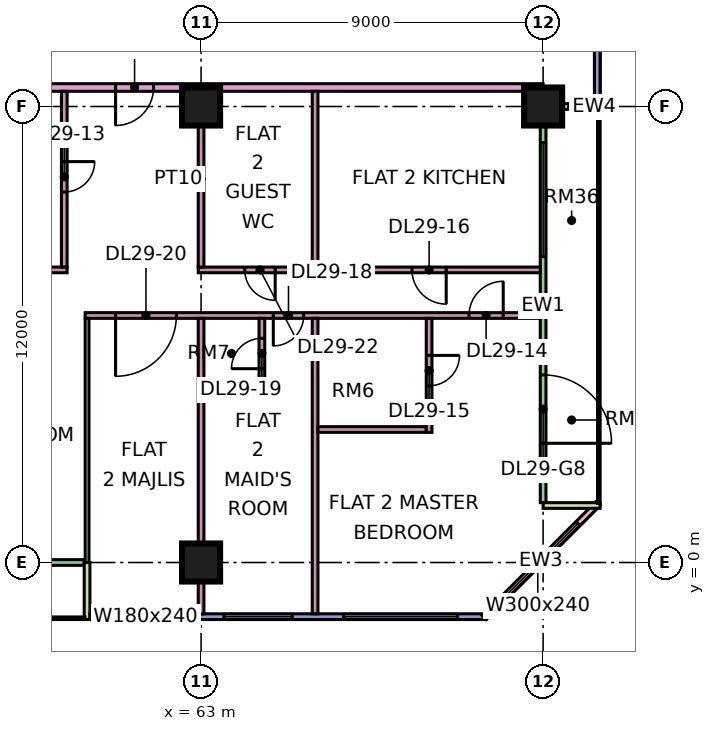
"""IFC4 building model, lengths in metres.
Left out: names, types, materials, properties, quantities, classifications, styles, units other than length and angle.
Written with IfcOpenShell. Run it as: python <this file> out.ifc"""

import sys

from ifc_helpers import new_model, si_unit, direction, frame, frame_2d, origin, origin_2d, place, context, subcontext, project, spatial, rectangle, extrude, element, fill, save


model = new_model("IFC4")
c1 = context("Model", 3, precision=1e-05, world=origin(), true_north=direction((0.0, 1.0)))
c2 = subcontext(c1, "Body", "Model", "MODEL_VIEW")
j1 = project(units=[si_unit("LENGTHUNIT", "METRE"), si_unit("PLANEANGLEUNIT", "RADIAN")], contexts=[c1])
p1 = place(None, origin())
s1 = spatial("IfcSite", under=j1, at=p1, CompositionType="ELEMENT")
p2 = place(p1, origin())
s2 = spatial("IfcBuilding", under=s1, at=p2, CompositionType="ELEMENT")
p3 = place(p2, frame((0.0, 0.0, 125.65)))
s3 = spatial("IfcBuildingStorey", under=s2, at=p3, CompositionType="ELEMENT", Elevation=125.65)
for number, where, z_axis, x_axis in (
    (1, (63.0, 0.0, 0.0), (0.0, 0.0, 1.0), (1.0, 0.0, 0.0)),
    (2, (63.0, 12.0, 0.0), (0.0, 0.0, 1.0), (1.0, 0.0, 0.0)),
    (3, (72.0, 12.0, 0.0), (0.0, 0.0, 1.0), (1.0, 0.0, 0.0)),
):
    element("IfcColumn", number, at=place(p3, frame(where, z_axis=z_axis, x_axis=x_axis)), inside=s3, PredefinedType="COLUMN", context=c2, shape_type="SweptSolid", body=[
        extrude(rectangle(XDim=1.0, YDim=1.0, at=origin_2d()), origin(), (0.0, 0.0, 1.0), 3.75),
    ])
p4 = place(p3, frame((48.075, 0.0, 0.0), z_axis=(0.0, 0.0, 1.0), x_axis=(1.0, 0.0, 0.0)))
e4 = element("IfcWall", 4, at=p4, inside=s3, PredefinedType="SOLIDWALL", context=c2, shape_type="SweptSolid", body=[
    extrude(rectangle(XDim=11.85, YDim=0.15, at=frame_2d((5.925, 0.0))), origin(), (0.0, 0.0, 1.0), 3.35),
])
p5 = place(p4, frame((0.562, 0.0, 0.45)))
e5 = element("IfcOpeningElement", 5, at=p5, cuts=e4, PredefinedType="OPENING", context=c2, shape_type="SweptSolid", body=[
    extrude(rectangle(XDim=1.8, YDim=2.4, at=frame_2d((0.9, 1.2))), frame((0.0, 0.085, 0.0), z_axis=(0.0, -1.0, 0.0), x_axis=(1.0, 0.0, 0.0)), (0.0, 0.0, 1.0), 0.17),
])
p6 = place(p4, frame((3.525, 0.0, 0.0)))
e6 = element("IfcOpeningElement", 6, at=p6, cuts=e4, PredefinedType="OPENING", context=c2, shape_type="SweptSolid", body=[
    extrude(rectangle(XDim=1.2, YDim=2.4, at=frame_2d((0.6, 1.2))), frame((0.0, 0.085, 0.0), z_axis=(0.0, -1.0, 0.0), x_axis=(1.0, 0.0, 0.0)), (0.0, 0.0, 1.0), 0.17),
])
p7 = place(p4, frame((7.688, 0.0, 0.45)))
e7 = element("IfcOpeningElement", 7, at=p7, cuts=e4, PredefinedType="OPENING", context=c2, shape_type="SweptSolid", body=[
    extrude(rectangle(XDim=3.0, YDim=2.4, at=frame_2d((1.5, 1.2))), frame((0.0, 0.085, 0.0), z_axis=(0.0, -1.0, 0.0), x_axis=(1.0, 0.0, 0.0)), (0.0, 0.0, 1.0), 0.17),
])
p8 = place(p3, frame((60.0, -1.5, 0.0), z_axis=(0.0, 0.0, 1.0), x_axis=(0.0, 1.0, 0.0)))
e8 = element("IfcWall", 8, at=p8, inside=s3, PredefinedType="SOLIDWALL", context=c2, shape_type="SweptSolid", body=[
    extrude(rectangle(XDim=1.5, YDim=0.15, at=frame_2d((0.75, 0.0))), origin(), (0.0, 0.0, 1.0), 3.35),
])
p9 = place(p3, frame((60.075, -1.425, 0.0), z_axis=(0.0, 0.0, 1.0), x_axis=(1.0, 0.0, 0.0)))
e9 = element("IfcWall", 9, at=p9, inside=s3, PredefinedType="SOLIDWALL", context=c2, shape_type="SweptSolid", body=[
    extrude(rectangle(XDim=10.425, YDim=0.15, at=frame_2d((5.212, 0.0))), origin(), (0.0, 0.0, 1.0), 3.35),
])
p10 = place(p9, frame((0.562, 0.0, 0.45)))
e10 = element("IfcOpeningElement", 10, at=p10, cuts=e9, PredefinedType="OPENING", context=c2, shape_type="SweptSolid", body=[
    extrude(rectangle(XDim=1.8, YDim=2.4, at=frame_2d((0.9, 1.2))), frame((0.0, 0.085, 0.0), z_axis=(0.0, -1.0, 0.0), x_axis=(1.0, 0.0, 0.0)), (0.0, 0.0, 1.0), 0.17),
])
p11 = place(p9, frame((3.525, 0.0, 0.45)))
e11 = element("IfcOpeningElement", 11, at=p11, cuts=e9, PredefinedType="OPENING", context=c2, shape_type="SweptSolid", body=[
    extrude(rectangle(XDim=1.8, YDim=2.4, at=frame_2d((0.9, 1.2))), frame((0.0, 0.085, 0.0), z_axis=(0.0, -1.0, 0.0), x_axis=(1.0, 0.0, 0.0)), (0.0, 0.0, 1.0), 0.17),
])
p12 = place(p9, frame((6.675, 0.0, 0.45)))
e12 = element("IfcOpeningElement", 12, at=p12, cuts=e9, PredefinedType="OPENING", context=c2, shape_type="SweptSolid", body=[
    extrude(rectangle(XDim=3.0, YDim=2.4, at=frame_2d((1.5, 1.2))), frame((0.0, 0.085, 0.0), z_axis=(0.0, -1.0, 0.0), x_axis=(1.0, 0.0, 0.0)), (0.0, 0.0, 1.0), 0.17),
])
p13 = place(p3, frame((70.447, -1.447, 0.0), z_axis=(0.0, 0.0, 1.0), x_axis=(0.707106781187, 0.707106781187, 0.0)))
e13 = element("IfcWall", 13, at=p13, inside=s3, PredefinedType="SOLIDWALL", context=c2, shape_type="SweptSolid", body=[
    extrude(rectangle(XDim=4.243, YDim=0.15, at=frame_2d((2.121, 0.0))), origin(), (0.0, 0.0, 1.0), 3.35),
])
p14 = place(p13, frame((0.498, 0.0, 0.45)))
e14 = element("IfcOpeningElement", 14, at=p14, cuts=e13, PredefinedType="OPENING", context=c2, shape_type="SweptSolid", body=[
    extrude(rectangle(XDim=3.0, YDim=2.4, at=frame_2d((1.5, 1.2))), frame((0.0, 0.085, 0.0), z_axis=(0.0, -1.0, 0.0), x_axis=(1.0, 0.0, 0.0)), (0.0, 0.0, 1.0), 0.17),
])
p15 = place(p3, frame((72.0, 1.575, 0.0), z_axis=(0.0, 0.0, 1.0), x_axis=(0.0, 1.0, 0.0)))
e15 = element("IfcWall", 15, at=p15, inside=s3, PredefinedType="SOLIDWALL", context=c2, shape_type="SweptSolid", body=[
    extrude(rectangle(XDim=10.35, YDim=0.15, at=frame_2d((5.175, 0.0))), origin(), (0.0, 0.0, 1.0), 3.35),
])
p16 = place(p15, frame((1.562, 0.0, 0.0)))
e16 = element("IfcOpeningElement", 16, at=p16, cuts=e15, PredefinedType="OPENING", context=c2, shape_type="SweptSolid", body=[
    extrude(rectangle(XDim=1.8, YDim=2.4, at=frame_2d((0.9, 1.2))), frame((0.0, 0.085, 0.0), z_axis=(0.0, -1.0, 0.0), x_axis=(1.0, 0.0, 0.0)), (0.0, 0.0, 1.0), 0.17),
])
p17 = place(p15, frame((6.475, 0.0, 0.45)))
e17 = element("IfcOpeningElement", 17, at=p17, cuts=e15, PredefinedType="OPENING", context=c2, shape_type="SweptSolid", body=[
    extrude(rectangle(XDim=3.0, YDim=2.4, at=frame_2d((1.5, 1.2))), frame((0.0, 0.085, 0.0), z_axis=(0.0, -1.0, 0.0), x_axis=(1.0, 0.0, 0.0)), (0.0, 0.0, 1.0), 0.17),
])
for number, where, z_axis, x_axis in (
    (18, (73.5, 1.5, 0.0), (0.0, 0.0, 1.0), (-1.0, 0.0, 0.0)),
    (19, (73.5, 12.0, 0.0), (0.0, 0.0, 1.0), (-1.0, 0.0, 0.0)),
):
    element("IfcWall", number, at=place(p3, frame(where, z_axis=z_axis, x_axis=x_axis)), inside=s3, PredefinedType="SOLIDWALL", context=c2, shape_type="SweptSolid", body=[
        extrude(rectangle(XDim=1.5, YDim=0.15, at=frame_2d((0.75, 0.0))), origin(), (0.0, 0.0, 1.0), 3.35),
    ])
p18 = place(p3, frame((73.425, 12.075, 0.0), z_axis=(0.0, 0.0, 1.0), x_axis=(0.0, 1.0, 0.0)))
e20 = element("IfcWall", 20, at=p18, inside=s3, PredefinedType="SOLIDWALL", context=c2, shape_type="SweptSolid", body=[
    extrude(rectangle(XDim=10.425, YDim=0.15, at=frame_2d((5.212, 0.0))), origin(), (0.0, 0.0, 1.0), 3.35),
])
p19 = place(p18, frame((4.575, 0.0, 0.45)))
e21 = element("IfcOpeningElement", 21, at=p19, cuts=e20, PredefinedType="OPENING", context=c2, shape_type="SweptSolid", body=[
    extrude(rectangle(XDim=4.8, YDim=2.4, at=frame_2d((2.4, 1.2))), frame((0.0, 0.085, 0.0), z_axis=(0.0, -1.0, 0.0), x_axis=(1.0, 0.0, 0.0)), (0.0, 0.0, 1.0), 0.17),
])
p20 = place(p3, frame((40.65, 12.5, 0.0), z_axis=(0.0, 0.0, 1.0), x_axis=(1.0, 0.0, 0.0)))
e22 = element("IfcWall", 22, at=p20, inside=s3, PredefinedType="PARTITIONING", context=c2, shape_type="SweptSolid", body=[
    extrude(rectangle(XDim=31.35, YDim=0.2, at=frame_2d((15.675, 0.0))), origin(), (0.0, 0.0, 1.0), 3.35),
])
p21 = place(p20, frame((20.1, 0.0, 0.0)))
e23 = element("IfcOpeningElement", 23, at=p21, cuts=e22, PredefinedType="OPENING", context=c2, shape_type="SweptSolid", body=[
    extrude(rectangle(XDim=1.0, YDim=2.1, at=frame_2d((0.5, 1.05))), frame((0.0, 0.11, 0.0), z_axis=(0.0, -1.0, 0.0), x_axis=(1.0, 0.0, 0.0)), (0.0, 0.0, 1.0), 0.22),
])
p22 = place(p20, frame((1.05, 0.0, 0.0)))
e24 = element("IfcOpeningElement", 24, at=p22, cuts=e22, PredefinedType="OPENING", context=c2, shape_type="SweptSolid", body=[
    extrude(rectangle(XDim=1.0, YDim=2.1, at=frame_2d((0.5, 1.05))), frame((0.0, 0.11, 0.0), z_axis=(0.0, -1.0, 0.0), x_axis=(1.0, 0.0, 0.0)), (0.0, 0.0, 1.0), 0.22),
])
p23 = place(p3, frame((54.1, 7.7, 0.0), z_axis=(0.0, 0.0, 1.0), x_axis=(1.0, 0.0, 0.0)))
e25 = element("IfcWall", 25, at=p23, inside=s3, PredefinedType="PARTITIONING", context=c2, shape_type="SweptSolid", body=[
    extrude(rectangle(XDim=5.375, YDim=0.15, at=frame_2d((2.688, 0.0))), origin(), (0.0, 0.0, 1.0), 3.35),
])
p24 = place(p23, frame((1.1, 0.0, 0.0)))
e26 = element("IfcOpeningElement", 26, at=p24, cuts=e25, PredefinedType="OPENING", context=c2, shape_type="SweptSolid", body=[
    extrude(rectangle(XDim=0.9, YDim=2.1, at=frame_2d((0.45, 1.05))), frame((0.0, 0.085, 0.0), z_axis=(0.0, -1.0, 0.0), x_axis=(1.0, 0.0, 0.0)), (0.0, 0.0, 1.0), 0.17),
])
p25 = place(p3, frame((59.4, 7.775, 0.0), z_axis=(0.0, 0.0, 1.0), x_axis=(0.0, 1.0, 0.0)))
e27 = element("IfcWall", 27, at=p25, inside=s3, PredefinedType="PARTITIONING", context=c2, shape_type="SweptSolid", body=[
    extrude(rectangle(XDim=4.625, YDim=0.15, at=frame_2d((2.312, 0.0))), origin(), (0.0, 0.0, 1.0), 3.35),
])
p26 = place(p25, frame((1.975, 0.0, 0.0)))
e28 = element("IfcOpeningElement", 28, at=p26, cuts=e27, PredefinedType="OPENING", context=c2, shape_type="SweptSolid", body=[
    extrude(rectangle(XDim=0.8, YDim=2.1, at=frame_2d((0.4, 1.05))), frame((0.0, 0.085, 0.0), z_axis=(0.0, -1.0, 0.0), x_axis=(1.0, 0.0, 0.0)), (0.0, 0.0, 1.0), 0.17),
])
p27 = place(p3, frame((59.95, 6.5, 0.0), z_axis=(0.0, 0.0, 1.0), x_axis=(1.0, 0.0, 0.0)))
e29 = element("IfcWall", 29, at=p27, inside=s3, PredefinedType="PARTITIONING", context=c2, shape_type="SweptSolid", body=[
    extrude(rectangle(XDim=11.976, YDim=0.15, at=frame_2d((5.988, 0.0))), origin(), (0.0, 0.0, 1.0), 3.35),
])
p28 = place(p27, frame((10.1, 0.0, 0.0)))
e30 = element("IfcOpeningElement", 30, at=p28, cuts=e29, PredefinedType="OPENING", context=c2, shape_type="SweptSolid", body=[
    extrude(rectangle(XDim=0.9, YDim=2.1, at=frame_2d((0.45, 1.05))), frame((0.0, 0.085, 0.0), z_axis=(0.0, -1.0, 0.0), x_axis=(1.0, 0.0, 0.0)), (0.0, 0.0, 1.0), 0.17),
])
p29 = place(p27, frame((4.95, 0.0, 0.0)))
e31 = element("IfcOpeningElement", 31, at=p29, cuts=e29, PredefinedType="OPENING", context=c2, shape_type="SweptSolid", body=[
    extrude(rectangle(XDim=0.8, YDim=2.1, at=frame_2d((0.4, 1.05))), frame((0.0, 0.085, 0.0), z_axis=(0.0, -1.0, 0.0), x_axis=(1.0, 0.0, 0.0)), (0.0, 0.0, 1.0), 0.17),
])
p30 = place(p27, frame((0.8, 0.0, 0.0)))
e32 = element("IfcOpeningElement", 32, at=p30, cuts=e29, PredefinedType="OPENING", context=c2, shape_type="SweptSolid", body=[
    extrude(rectangle(XDim=1.6, YDim=2.1, at=frame_2d((0.8, 1.05))), frame((0.0, 0.085, 0.0), z_axis=(0.0, -1.0, 0.0), x_axis=(1.0, 0.0, 0.0)), (0.0, 0.0, 1.0), 0.17),
])
p31 = place(p3, frame((60.0, 0.0, 0.0), z_axis=(0.0, 0.0, 1.0), x_axis=(0.0, 1.0, 0.0)))
e33 = element("IfcWall", 33, at=p31, inside=s3, PredefinedType="PARTITIONING", context=c2, shape_type="SweptSolid", body=[
    extrude(rectangle(XDim=6.425, YDim=0.1, at=frame_2d((3.212, 0.0))), origin(), (0.0, 0.0, 1.0), 3.35),
])
p32 = place(p3, frame((62.925, 7.7, 0.0), z_axis=(0.0, 0.0, 1.0), x_axis=(1.0, 0.0, 0.0)))
e34 = element("IfcWall", 34, at=p32, inside=s3, PredefinedType="PARTITIONING", context=c2, shape_type="SweptSolid", body=[
    extrude(rectangle(XDim=9.001, YDim=0.15, at=frame_2d((4.5, 0.0))), origin(), (0.0, 0.0, 1.0), 3.35),
])
p33 = place(p32, frame((5.625, 0.0, 0.0)))
e35 = element("IfcOpeningElement", 35, at=p33, cuts=e34, PredefinedType="OPENING", context=c2, shape_type="SweptSolid", body=[
    extrude(rectangle(XDim=0.9, YDim=2.1, at=frame_2d((0.45, 1.05))), frame((0.0, 0.085, 0.0), z_axis=(0.0, -1.0, 0.0), x_axis=(1.0, 0.0, 0.0)), (0.0, 0.0, 1.0), 0.17),
])
p34 = place(p32, frame((1.225, 0.0, 0.0)))
e36 = element("IfcOpeningElement", 36, at=p34, cuts=e34, PredefinedType="OPENING", context=c2, shape_type="SweptSolid", body=[
    extrude(rectangle(XDim=0.8, YDim=2.1, at=frame_2d((0.4, 1.05))), frame((0.0, 0.085, 0.0), z_axis=(0.0, -1.0, 0.0), x_axis=(1.0, 0.0, 0.0)), (0.0, 0.0, 1.0), 0.17),
])
p35 = place(p3, frame((63.0, -1.351, 0.0), z_axis=(0.0, 0.0, 1.0), x_axis=(0.0, 1.0, 0.0)))
e37 = element("IfcWall", 37, at=p35, inside=s3, PredefinedType="PARTITIONING", context=c2, shape_type="SweptSolid", body=[
    extrude(rectangle(XDim=7.776, YDim=0.15, at=frame_2d((3.888, 0.0))), origin(), (0.0, 0.0, 1.0), 3.35),
])
p36 = place(p3, frame((63.0, 7.775, 0.0), z_axis=(0.0, 0.0, 1.0), x_axis=(0.0, 1.0, 0.0)))
e38 = element("IfcWall", 38, at=p36, inside=s3, PredefinedType="PARTITIONING", context=c2, shape_type="SweptSolid", body=[
    extrude(rectangle(XDim=4.625, YDim=0.15, at=frame_2d((2.312, 0.0))), origin(), (0.0, 0.0, 1.0), 3.35),
])
p37 = place(p3, frame((63.075, 4.5, 0.0), z_axis=(0.0, 0.0, 1.0), x_axis=(1.0, 0.0, 0.0)))
e39 = element("IfcWall", 39, at=p37, inside=s3, PredefinedType="PARTITIONING", context=c2, shape_type="SweptSolid", body=[
    extrude(rectangle(XDim=1.45, YDim=0.15, at=frame_2d((0.725, 0.0))), origin(), (0.0, 0.0, 1.0), 3.35),
])
p38 = place(p3, frame((64.6, 4.425, 0.0), z_axis=(0.0, 0.0, 1.0), x_axis=(0.0, 1.0, 0.0)))
e40 = element("IfcWall", 40, at=p38, inside=s3, PredefinedType="PARTITIONING", context=c2, shape_type="SweptSolid", body=[
    extrude(rectangle(XDim=2.0, YDim=0.15, at=frame_2d((1.0, 0.0))), origin(), (0.0, 0.0, 1.0), 3.35),
])
p39 = place(p38, frame((0.675, 0.0, 0.0)))
e41 = element("IfcOpeningElement", 41, at=p39, cuts=e40, PredefinedType="OPENING", context=c2, shape_type="SweptSolid", body=[
    extrude(rectangle(XDim=0.8, YDim=2.1, at=frame_2d((0.4, 1.05))), frame((0.0, 0.085, 0.0), z_axis=(0.0, -1.0, 0.0), x_axis=(1.0, 0.0, 0.0)), (0.0, 0.0, 1.0), 0.17),
])
p40 = place(p3, frame((66.0, -1.351, 0.0), z_axis=(0.0, 0.0, 1.0), x_axis=(0.0, 1.0, 0.0)))
e42 = element("IfcWall", 42, at=p40, inside=s3, PredefinedType="PARTITIONING", context=c2, shape_type="SweptSolid", body=[
    extrude(rectangle(XDim=7.776, YDim=0.15, at=frame_2d((3.888, 0.0))), origin(), (0.0, 0.0, 1.0), 3.35),
])
p41 = place(p3, frame((66.0, 7.775, 0.0), z_axis=(0.0, 0.0, 1.0), x_axis=(0.0, 1.0, 0.0)))
e43 = element("IfcWall", 43, at=p41, inside=s3, PredefinedType="PARTITIONING", context=c2, shape_type="SweptSolid", body=[
    extrude(rectangle(XDim=4.625, YDim=0.15, at=frame_2d((2.312, 0.0))), origin(), (0.0, 0.0, 1.0), 3.35),
])
p42 = place(p3, frame((66.075, 3.5, 0.0), z_axis=(0.0, 0.0, 1.0), x_axis=(1.0, 0.0, 0.0)))
e44 = element("IfcWall", 44, at=p42, inside=s3, PredefinedType="PARTITIONING", context=c2, shape_type="SweptSolid", body=[
    extrude(rectangle(XDim=2.85, YDim=0.15, at=frame_2d((1.425, 0.0))), origin(), (0.0, 0.0, 1.0), 3.35),
])
p43 = place(p3, frame((69.0, 3.425, 0.0), z_axis=(0.0, 0.0, 1.0), x_axis=(0.0, 1.0, 0.0)))
e45 = element("IfcWall", 45, at=p43, inside=s3, PredefinedType="PARTITIONING", context=c2, shape_type="SweptSolid", body=[
    extrude(rectangle(XDim=3.0, YDim=0.15, at=frame_2d((1.5, 0.0))), origin(), (0.0, 0.0, 1.0), 3.35),
])
p44 = place(p43, frame((1.225, 0.0, 0.0)))
e46 = element("IfcOpeningElement", 46, at=p44, cuts=e45, PredefinedType="OPENING", context=c2, shape_type="SweptSolid", body=[
    extrude(rectangle(XDim=0.8, YDim=2.1, at=frame_2d((0.4, 1.05))), frame((0.0, 0.085, 0.0), z_axis=(0.0, -1.0, 0.0), x_axis=(1.0, 0.0, 0.0)), (0.0, 0.0, 1.0), 0.17),
])
p45 = place(p10, origin())
e47 = element("IfcWindow", 47, at=p45, inside=s3, PartitioningType="SINGLE_PANEL", PredefinedType="WINDOW", context=c2, shape_type="SweptSolid", body=[
    extrude(rectangle(XDim=1.8, YDim=2.4, at=frame_2d((0.9, 1.2))), frame((0.0, 0.03, 0.0), z_axis=(0.0, -1.0, 0.0), x_axis=(1.0, 0.0, 0.0)), (0.0, 0.0, 1.0), 0.06),
])
fill(e10, e47)
p46 = place(p11, origin())
e48 = element("IfcWindow", 48, at=p46, inside=s3, PartitioningType="SINGLE_PANEL", PredefinedType="WINDOW", context=c2, shape_type="SweptSolid", body=[
    extrude(rectangle(XDim=1.8, YDim=2.4, at=frame_2d((0.9, 1.2))), frame((0.0, 0.03, 0.0), z_axis=(0.0, -1.0, 0.0), x_axis=(1.0, 0.0, 0.0)), (0.0, 0.0, 1.0), 0.06),
])
fill(e11, e48)
p47 = place(p12, origin())
e49 = element("IfcWindow", 49, at=p47, inside=s3, PartitioningType="SINGLE_PANEL", PredefinedType="WINDOW", context=c2, shape_type="SweptSolid", body=[
    extrude(rectangle(XDim=3.0, YDim=2.4, at=frame_2d((1.5, 1.2))), frame((0.0, 0.03, 0.0), z_axis=(0.0, -1.0, 0.0), x_axis=(1.0, 0.0, 0.0)), (0.0, 0.0, 1.0), 0.06),
])
fill(e12, e49)
p48 = place(p14, origin())
e50 = element("IfcWindow", 50, at=p48, inside=s3, PartitioningType="SINGLE_PANEL", PredefinedType="WINDOW", context=c2, shape_type="SweptSolid", body=[
    extrude(rectangle(XDim=3.0, YDim=2.4, at=frame_2d((1.5, 1.2))), frame((0.0, 0.03, 0.0), z_axis=(0.0, -1.0, 0.0), x_axis=(1.0, 0.0, 0.0)), (0.0, 0.0, 1.0), 0.06),
])
fill(e14, e50)
p49 = place(p16, frame((1.8, 0.0, 0.0), z_axis=(0.0, 0.0, 1.0), x_axis=(-1.0, 0.0, 0.0)))
e51 = element("IfcDoor", 51, at=p49, inside=s3, OperationType="DOUBLE_DOOR_SINGLE_SWING", PredefinedType="DOOR", context=c2, shape_type="SweptSolid", body=[
    extrude(rectangle(XDim=1.8, YDim=2.4, at=frame_2d((0.9, 1.2))), frame((0.0, 0.025, 0.0), z_axis=(0.0, -1.0, 0.0), x_axis=(1.0, 0.0, 0.0)), (0.0, 0.0, 1.0), 0.05),
])
fill(e16, e51)
p50 = place(p17, origin())
e52 = element("IfcWindow", 52, at=p50, inside=s3, PartitioningType="SINGLE_PANEL", PredefinedType="WINDOW", context=c2, shape_type="SweptSolid", body=[
    extrude(rectangle(XDim=3.0, YDim=2.4, at=frame_2d((1.5, 1.2))), frame((0.0, 0.03, 0.0), z_axis=(0.0, -1.0, 0.0), x_axis=(1.0, 0.0, 0.0)), (0.0, 0.0, 1.0), 0.06),
])
fill(e17, e52)
p51 = place(p26, origin())
e53 = element("IfcDoor", 53, at=p51, inside=s3, OperationType="SINGLE_SWING_RIGHT", PredefinedType="DOOR", context=c2, shape_type="SweptSolid", body=[
    extrude(rectangle(XDim=0.8, YDim=2.1, at=frame_2d((0.4, 1.05))), frame((0.0, 0.025, 0.0), z_axis=(0.0, -1.0, 0.0), x_axis=(1.0, 0.0, 0.0)), (0.0, 0.0, 1.0), 0.05),
])
fill(e28, e53)
p52 = place(p28, frame((0.9, 0.0, 0.0), z_axis=(0.0, 0.0, 1.0), x_axis=(-1.0, 0.0, 0.0)))
e54 = element("IfcDoor", 54, at=p52, inside=s3, OperationType="SINGLE_SWING_RIGHT", PredefinedType="DOOR", context=c2, shape_type="SweptSolid", body=[
    extrude(rectangle(XDim=0.9, YDim=2.1, at=frame_2d((0.45, 1.05))), frame((0.0, 0.025, 0.0), z_axis=(0.0, -1.0, 0.0), x_axis=(1.0, 0.0, 0.0)), (0.0, 0.0, 1.0), 0.05),
])
fill(e30, e54)
p53 = place(p44, origin())
e55 = element("IfcDoor", 55, at=p53, inside=s3, OperationType="SINGLE_SWING_RIGHT", PredefinedType="DOOR", context=c2, shape_type="SweptSolid", body=[
    extrude(rectangle(XDim=0.8, YDim=2.1, at=frame_2d((0.4, 1.05))), frame((0.0, 0.025, 0.0), z_axis=(0.0, -1.0, 0.0), x_axis=(1.0, 0.0, 0.0)), (0.0, 0.0, 1.0), 0.05),
])
fill(e46, e55)
p54 = place(p33, origin())
e56 = element("IfcDoor", 56, at=p54, inside=s3, OperationType="SINGLE_SWING_RIGHT", PredefinedType="DOOR", context=c2, shape_type="SweptSolid", body=[
    extrude(rectangle(XDim=0.9, YDim=2.1, at=frame_2d((0.45, 1.05))), frame((0.0, 0.025, 0.0), z_axis=(0.0, -1.0, 0.0), x_axis=(1.0, 0.0, 0.0)), (0.0, 0.0, 1.0), 0.05),
])
fill(e35, e56)
p55 = place(p21, frame((1.0, 0.0, 0.0), z_axis=(0.0, 0.0, 1.0), x_axis=(-1.0, 0.0, 0.0)))
e57 = element("IfcDoor", 57, at=p55, inside=s3, OperationType="SINGLE_SWING_LEFT", PredefinedType="DOOR", context=c2, shape_type="SweptSolid", body=[
    extrude(rectangle(XDim=1.0, YDim=2.1, at=frame_2d((0.5, 1.05))), frame((0.0, 0.025, 0.0), z_axis=(0.0, -1.0, 0.0), x_axis=(1.0, 0.0, 0.0)), (0.0, 0.0, 1.0), 0.05),
])
fill(e23, e57)
p56 = place(p29, frame((0.8, 0.0, 0.0), z_axis=(0.0, 0.0, 1.0), x_axis=(-1.0, 0.0, 0.0)))
e58 = element("IfcDoor", 58, at=p56, inside=s3, OperationType="SINGLE_SWING_LEFT", PredefinedType="DOOR", context=c2, shape_type="SweptSolid", body=[
    extrude(rectangle(XDim=0.8, YDim=2.1, at=frame_2d((0.4, 1.05))), frame((0.0, 0.025, 0.0), z_axis=(0.0, -1.0, 0.0), x_axis=(1.0, 0.0, 0.0)), (0.0, 0.0, 1.0), 0.05),
])
fill(e31, e58)
p57 = place(p39, origin())
e59 = element("IfcDoor", 59, at=p57, inside=s3, OperationType="SINGLE_SWING_LEFT", PredefinedType="DOOR", context=c2, shape_type="SweptSolid", body=[
    extrude(rectangle(XDim=0.8, YDim=2.1, at=frame_2d((0.4, 1.05))), frame((0.0, 0.025, 0.0), z_axis=(0.0, -1.0, 0.0), x_axis=(1.0, 0.0, 0.0)), (0.0, 0.0, 1.0), 0.05),
])
fill(e41, e59)
p58 = place(p30, frame((1.6, 0.0, 0.0), z_axis=(0.0, 0.0, 1.0), x_axis=(-1.0, 0.0, 0.0)))
e60 = element("IfcDoor", 60, at=p58, inside=s3, OperationType="DOUBLE_DOOR_SINGLE_SWING", PredefinedType="DOOR", context=c2, shape_type="SweptSolid", body=[
    extrude(rectangle(XDim=1.6, YDim=2.1, at=frame_2d((0.8, 1.05))), frame((0.0, 0.025, 0.0), z_axis=(0.0, -1.0, 0.0), x_axis=(1.0, 0.0, 0.0)), (0.0, 0.0, 1.0), 0.05),
])
fill(e32, e60)
p59 = place(p34, origin())
e61 = element("IfcDoor", 61, at=p59, inside=s3, OperationType="SINGLE_SWING_RIGHT", PredefinedType="DOOR", context=c2, shape_type="SweptSolid", body=[
    extrude(rectangle(XDim=0.8, YDim=2.1, at=frame_2d((0.4, 1.05))), frame((0.0, 0.025, 0.0), z_axis=(0.0, -1.0, 0.0), x_axis=(1.0, 0.0, 0.0)), (0.0, 0.0, 1.0), 0.05),
])
fill(e36, e61)
save(model, sys.argv[1])
